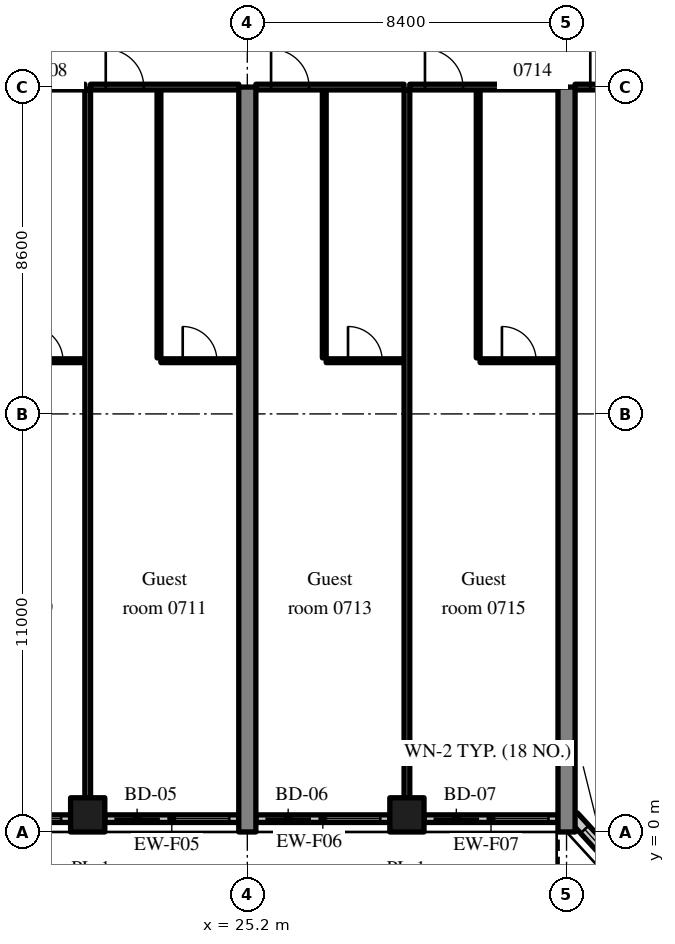
"""IFC4 building model, lengths in metres.
Left out: names, types, materials, properties, quantities, classifications, styles, units other than length and angle.
Written with IfcOpenShell. Run it as: python <this file> out.ifc"""

import sys

from ifc_helpers import new_model, si_unit, direction, frame, frame_2d, origin, origin_2d, place, context, subcontext, project, spatial, rectangle, extrude, source, transform, mapped, element, fill, save


model = new_model("IFC4")
c1 = context("Model", 3, precision=1e-05, world=origin(), true_north=direction((0.0, 1.0)))
c2 = subcontext(c1, "Body", "Model", "MODEL_VIEW")
j1 = project(units=[si_unit("LENGTHUNIT", "METRE"), si_unit("PLANEANGLEUNIT", "RADIAN")], contexts=[c1])
p1 = place(None, origin())
s1 = spatial("IfcSite", under=j1, at=p1, CompositionType="ELEMENT")
p2 = place(p1, origin())
s2 = spatial("IfcBuilding", under=s1, at=p2, CompositionType="ELEMENT")
p3 = place(p2, frame((0.0, 0.0, 35.4)))
s3 = spatial("IfcBuildingStorey", under=s2, at=p3, CompositionType="ELEMENT", Elevation=35.4)
m1 = source(origin(), c2, "Body", "SweptSolid", [
    extrude(rectangle(XDim=19.6, YDim=0.45, at=frame_2d((9.8, 0.0))), origin(), (0.0, 0.0, 1.0), 3.52),
])
for number, where, z_axis, x_axis in (
    (1, (25.2, 0.0, 0.0), (0.0, 0.0, 1.0), (0.0, 1.0, 0.0)),
    (2, (33.6, 0.0, 0.0), (0.0, 0.0, 1.0), (0.0, 1.0, 0.0)),
):
    element("IfcWall", number, at=place(p3, frame(where, z_axis=z_axis, x_axis=x_axis)), inside=s3, PredefinedType="SHEAR", context=c2, shape_type="MappedRepresentation", body=[
        mapped(m1, transform((0.0, 0.0, 0.0), scale=1.0)),
    ])
m2 = source(origin(), c2, "Body", "SweptSolid", [
    extrude(rectangle(XDim=0.9, YDim=0.9, at=origin_2d()), origin(), (0.0, 0.0, 1.0), 3.52),
])
for number, where, z_axis, x_axis in (
    (3, (21.0, 0.45, 0.0), (0.0, 0.0, 1.0), (1.0, 0.0, 0.0)),
    (4, (29.4, 0.45, 0.0), (0.0, 0.0, 1.0), (1.0, 0.0, 0.0)),
):
    element("IfcColumn", number, at=place(p3, frame(where, z_axis=z_axis, x_axis=x_axis)), inside=s3, PredefinedType="COLUMN", context=c2, shape_type="MappedRepresentation", body=[
        mapped(m2, transform((0.0, 0.0, 0.0), scale=1.0)),
    ])
m3 = source(origin(), c2, "Body", "SweptSolid", [
    extrude(rectangle(XDim=3.525, YDim=0.2, at=frame_2d((1.763, 0.0))), origin(), (0.0, 0.0, 1.0), 2.77),
])
p4 = place(p3, frame((17.025, 0.35, 0.0), z_axis=(0.0, 0.0, 1.0), x_axis=(1.0, 0.0, 0.0)))
e5 = element("IfcWall", 5, at=p4, inside=s3, PredefinedType="SOLIDWALL", context=c2, shape_type="MappedRepresentation", body=[
    mapped(m3, transform((0.0, 0.0, 0.0), scale=1.0)),
])
m4 = source(origin(), c2, "Body", "SweptSolid", [
    extrude(rectangle(XDim=1.2, YDim=2.4, at=frame_2d((0.6, 1.2))), frame((0.0, 0.11, 0.0), z_axis=(0.0, -1.0, 0.0), x_axis=(1.0, 0.0, 0.0)), (0.0, 0.0, 1.0), 0.22),
])
p5 = place(p4, frame((0.25, 0.0, 0.0)))
e6 = element("IfcOpeningElement", 6, at=p5, cuts=e5, PredefinedType="OPENING", context=c2, shape_type="MappedRepresentation", body=[
    mapped(m4, transform((0.0, 0.0, 0.0), scale=1.0)),
])
m5 = source(origin(), c2, "Body", "SweptSolid", [
    extrude(rectangle(XDim=1.5, YDim=1.5, at=frame_2d((0.75, 0.75))), frame((0.0, 0.11, 0.0), z_axis=(0.0, -1.0, 0.0), x_axis=(1.0, 0.0, 0.0)), (0.0, 0.0, 1.0), 0.22),
])
p6 = place(p4, frame((1.775, 0.0, 0.9)))
e7 = element("IfcOpeningElement", 7, at=p6, cuts=e5, PredefinedType="OPENING", context=c2, shape_type="MappedRepresentation", body=[
    mapped(m5, transform((0.0, 0.0, 0.0), scale=1.0)),
])
p7 = place(p3, frame((21.45, 0.35, 0.0), z_axis=(0.0, 0.0, 1.0), x_axis=(1.0, 0.0, 0.0)))
e8 = element("IfcWall", 8, at=p7, inside=s3, PredefinedType="SOLIDWALL", context=c2, shape_type="MappedRepresentation", body=[
    mapped(m3, transform((0.0, 0.0, 0.0), scale=1.0)),
])
p8 = place(p7, frame((0.25, 0.0, 0.0)))
e9 = element("IfcOpeningElement", 9, at=p8, cuts=e8, PredefinedType="OPENING", context=c2, shape_type="MappedRepresentation", body=[
    mapped(m4, transform((0.0, 0.0, 0.0), scale=1.0)),
])
p9 = place(p7, frame((1.775, 0.0, 0.9)))
e10 = element("IfcOpeningElement", 10, at=p9, cuts=e8, PredefinedType="OPENING", context=c2, shape_type="MappedRepresentation", body=[
    mapped(m5, transform((0.0, 0.0, 0.0), scale=1.0)),
])
m6 = source(origin(), c2, "Body", "SweptSolid", [
    extrude(rectangle(XDim=3.525, YDim=0.2, at=frame_2d((1.762, 0.0))), origin(), (0.0, 0.0, 1.0), 2.77),
])
p10 = place(p3, frame((25.425, 0.35, 0.0), z_axis=(0.0, 0.0, 1.0), x_axis=(1.0, 0.0, 0.0)))
e11 = element("IfcWall", 11, at=p10, inside=s3, PredefinedType="SOLIDWALL", context=c2, shape_type="MappedRepresentation", body=[
    mapped(m6, transform((0.0, 0.0, 0.0), scale=1.0)),
])
p11 = place(p10, frame((0.25, 0.0, 0.0)))
e12 = element("IfcOpeningElement", 12, at=p11, cuts=e11, PredefinedType="OPENING", context=c2, shape_type="MappedRepresentation", body=[
    mapped(m4, transform((0.0, 0.0, 0.0), scale=1.0)),
])
p12 = place(p10, frame((1.775, 0.0, 0.9)))
e13 = element("IfcOpeningElement", 13, at=p12, cuts=e11, PredefinedType="OPENING", context=c2, shape_type="MappedRepresentation", body=[
    mapped(m5, transform((0.0, 0.0, 0.0), scale=1.0)),
])
p13 = place(p3, frame((29.85, 0.35, 0.0), z_axis=(0.0, 0.0, 1.0), x_axis=(1.0, 0.0, 0.0)))
e14 = element("IfcWall", 14, at=p13, inside=s3, PredefinedType="SOLIDWALL", context=c2, shape_type="MappedRepresentation", body=[
    mapped(m6, transform((0.0, 0.0, 0.0), scale=1.0)),
])
p14 = place(p13, frame((0.25, 0.0, 0.0)))
e15 = element("IfcOpeningElement", 15, at=p14, cuts=e14, PredefinedType="OPENING", context=c2, shape_type="MappedRepresentation", body=[
    mapped(m4, transform((0.0, 0.0, 0.0), scale=1.0)),
])
p15 = place(p13, frame((1.775, 0.0, 0.9)))
e16 = element("IfcOpeningElement", 16, at=p15, cuts=e14, PredefinedType="OPENING", context=c2, shape_type="MappedRepresentation", body=[
    mapped(m5, transform((0.0, 0.0, 0.0), scale=1.0)),
])
m7 = source(origin(), c2, "Body", "SweptSolid", [
    extrude(rectangle(XDim=2.398, YDim=0.3, at=frame_2d((1.199, 0.0))), origin(), (0.0, 0.0, 1.0), 3.52),
])
p16 = place(p3, frame((33.776, 0.4, 0.0), z_axis=(0.0, 0.0, 1.0), x_axis=(0.675374189419, -0.737475222815, 0.0)))
e17 = element("IfcWall", 17, at=p16, inside=s3, PredefinedType="SOLIDWALL", context=c2, shape_type="MappedRepresentation", body=[
    mapped(m7, transform((0.0, 0.0, 0.0), scale=1.0)),
])
m8 = source(origin(), c2, "Body", "SweptSolid", [
    extrude(rectangle(XDim=1.5, YDim=2.0, at=frame_2d((0.75, 1.0))), frame((0.0, 0.16, 0.0), z_axis=(0.0, -1.0, 0.0), x_axis=(1.0, 0.0, 0.0)), (0.0, 0.0, 1.0), 0.32),
])
p17 = place(p16, frame((0.449, 0.0, 0.9)))
e18 = element("IfcOpeningElement", 18, at=p17, cuts=e17, PredefinedType="OPENING", context=c2, shape_type="MappedRepresentation", body=[
    mapped(m8, transform((0.0, 0.0, 0.0), scale=1.0)),
])
m9 = source(origin(), c2, "Body", "SweptSolid", [
    extrude(rectangle(XDim=2.05, YDim=0.1, at=frame_2d((1.025, 0.0))), origin(), (0.0, 0.0, 1.0), 3.52),
])
p18 = place(p3, frame((18.875, 12.4, 0.0), z_axis=(0.0, 0.0, 1.0), x_axis=(1.0, 0.0, 0.0)))
e19 = element("IfcWall", 19, at=p18, inside=s3, PredefinedType="PARTITIONING", context=c2, shape_type="MappedRepresentation", body=[
    mapped(m9, transform((0.0, 0.0, 0.0), scale=1.0)),
])
m10 = source(origin(), c2, "Body", "SweptSolid", [
    extrude(rectangle(XDim=0.9, YDim=2.1, at=frame_2d((0.45, 1.05))), frame((0.0, 0.06, 0.0), z_axis=(0.0, -1.0, 0.0), x_axis=(1.0, 0.0, 0.0)), (0.0, 0.0, 1.0), 0.12),
])
p19 = place(p18, frame((0.575, 0.0, 0.0)))
e20 = element("IfcOpeningElement", 20, at=p19, cuts=e19, PredefinedType="OPENING", context=c2, shape_type="MappedRepresentation", body=[
    mapped(m10, transform((0.0, 0.0, 0.0), scale=1.0)),
])
m11 = source(origin(), c2, "Body", "SweptSolid", [
    extrude(rectangle(XDim=3.9, YDim=0.15, at=frame_2d((1.95, 0.0))), origin(), (0.0, 0.0, 1.0), 2.82),
])
p20 = place(p3, frame((17.025, 19.6, 0.0), z_axis=(0.0, 0.0, 1.0), x_axis=(1.0, 0.0, 0.0)))
e21 = element("IfcWall", 21, at=p20, inside=s3, PredefinedType="PARTITIONING", context=c2, shape_type="MappedRepresentation", body=[
    mapped(m11, transform((0.0, 0.0, 0.0), scale=1.0)),
])
m12 = source(origin(), c2, "Body", "SweptSolid", [
    extrude(rectangle(XDim=1.0, YDim=2.1, at=frame_2d((0.5, 1.05))), frame((0.0, 0.085, 0.0), z_axis=(0.0, -1.0, 0.0), x_axis=(1.0, 0.0, 0.0)), (0.0, 0.0, 1.0), 0.17),
])
p21 = place(p20, frame((0.4, 0.0, 0.0)))
e22 = element("IfcOpeningElement", 22, at=p21, cuts=e21, PredefinedType="OPENING", context=c2, shape_type="MappedRepresentation", body=[
    mapped(m12, transform((0.0, 0.0, 0.0), scale=1.0)),
])
m13 = source(origin(), c2, "Body", "SweptSolid", [
    extrude(rectangle(XDim=7.05, YDim=0.1, at=frame_2d((3.525, 0.0))), origin(), (0.0, 0.0, 1.0), 3.52),
])
p22 = place(p3, frame((22.875, 12.475, 0.0), z_axis=(0.0, 0.0, 1.0), x_axis=(0.0, 1.0, 0.0)))
e23 = element("IfcWall", 23, at=p22, inside=s3, PredefinedType="PARTITIONING", context=c2, shape_type="MappedRepresentation", body=[
    mapped(m13, transform((0.0, 0.0, 0.0), scale=1.0)),
])
p23 = place(p3, frame((22.925, 12.4, 0.0), z_axis=(0.0, 0.0, 1.0), x_axis=(1.0, 0.0, 0.0)))
e24 = element("IfcWall", 24, at=p23, inside=s3, PredefinedType="PARTITIONING", context=c2, shape_type="MappedRepresentation", body=[
    mapped(m9, transform((0.0, 0.0, 0.0), scale=1.0)),
])
p24 = place(p23, frame((0.575, 0.0, 0.0)))
e25 = element("IfcOpeningElement", 25, at=p24, cuts=e24, PredefinedType="OPENING", context=c2, shape_type="MappedRepresentation", body=[
    mapped(m10, transform((0.0, 0.0, 0.0), scale=1.0)),
])
p25 = place(p3, frame((21.075, 19.6, 0.0), z_axis=(0.0, 0.0, 1.0), x_axis=(1.0, 0.0, 0.0)))
e26 = element("IfcWall", 26, at=p25, inside=s3, PredefinedType="PARTITIONING", context=c2, shape_type="MappedRepresentation", body=[
    mapped(m11, transform((0.0, 0.0, 0.0), scale=1.0)),
])
p26 = place(p25, frame((0.4, 0.0, 0.0)))
e27 = element("IfcOpeningElement", 27, at=p26, cuts=e26, PredefinedType="OPENING", context=c2, shape_type="MappedRepresentation", body=[
    mapped(m12, transform((0.0, 0.0, 0.0), scale=1.0)),
])
m14 = source(origin(), c2, "Body", "SweptSolid", [
    extrude(rectangle(XDim=18.625, YDim=0.15, at=frame_2d((9.312, 0.0))), origin(), (0.0, 0.0, 1.0), 3.52),
])
p27 = place(p3, frame((21.0, 0.9, 0.0), z_axis=(0.0, 0.0, 1.0), x_axis=(0.0, 1.0, 0.0)))
e28 = element("IfcWall", 28, at=p27, inside=s3, PredefinedType="PARTITIONING", context=c2, shape_type="MappedRepresentation", body=[
    mapped(m14, transform((0.0, 0.0, 0.0), scale=1.0)),
])
p28 = place(p3, frame((27.225, 12.475, 0.0), z_axis=(0.0, 0.0, 1.0), x_axis=(0.0, 1.0, 0.0)))
e29 = element("IfcWall", 29, at=p28, inside=s3, PredefinedType="PARTITIONING", context=c2, shape_type="MappedRepresentation", body=[
    mapped(m13, transform((0.0, 0.0, 0.0), scale=1.0)),
])
p29 = place(p3, frame((27.275, 12.4, 0.0), z_axis=(0.0, 0.0, 1.0), x_axis=(1.0, 0.0, 0.0)))
e30 = element("IfcWall", 30, at=p29, inside=s3, PredefinedType="PARTITIONING", context=c2, shape_type="MappedRepresentation", body=[
    mapped(m9, transform((0.0, 0.0, 0.0), scale=1.0)),
])
p30 = place(p29, frame((0.575, 0.0, 0.0)))
e31 = element("IfcOpeningElement", 31, at=p30, cuts=e30, PredefinedType="OPENING", context=c2, shape_type="MappedRepresentation", body=[
    mapped(m10, transform((0.0, 0.0, 0.0), scale=1.0)),
])
m15 = source(origin(), c2, "Body", "SweptSolid", [
    extrude(rectangle(XDim=3.9, YDim=0.15, at=frame_2d((1.95, 0.0))), origin(), (0.0, 0.0, 1.0), 2.82),
])
p31 = place(p3, frame((25.425, 19.6, 0.0), z_axis=(0.0, 0.0, 1.0), x_axis=(1.0, 0.0, 0.0)))
e32 = element("IfcWall", 32, at=p31, inside=s3, PredefinedType="PARTITIONING", context=c2, shape_type="MappedRepresentation", body=[
    mapped(m15, transform((0.0, 0.0, 0.0), scale=1.0)),
])
p32 = place(p31, frame((0.4, 0.0, 0.0)))
e33 = element("IfcOpeningElement", 33, at=p32, cuts=e32, PredefinedType="OPENING", context=c2, shape_type="MappedRepresentation", body=[
    mapped(m12, transform((0.0, 0.0, 0.0), scale=1.0)),
])
p33 = place(p3, frame((31.275, 12.475, 0.0), z_axis=(0.0, 0.0, 1.0), x_axis=(0.0, 1.0, 0.0)))
e34 = element("IfcWall", 34, at=p33, inside=s3, PredefinedType="PARTITIONING", context=c2, shape_type="MappedRepresentation", body=[
    mapped(m13, transform((0.0, 0.0, 0.0), scale=1.0)),
])
p34 = place(p3, frame((31.325, 12.4, 0.0), z_axis=(0.0, 0.0, 1.0), x_axis=(1.0, 0.0, 0.0)))
e35 = element("IfcWall", 35, at=p34, inside=s3, PredefinedType="PARTITIONING", context=c2, shape_type="MappedRepresentation", body=[
    mapped(m9, transform((0.0, 0.0, 0.0), scale=1.0)),
])
p35 = place(p34, frame((0.575, 0.0, 0.0)))
e36 = element("IfcOpeningElement", 36, at=p35, cuts=e35, PredefinedType="OPENING", context=c2, shape_type="MappedRepresentation", body=[
    mapped(m10, transform((0.0, 0.0, 0.0), scale=1.0)),
])
p36 = place(p3, frame((29.475, 19.6, 0.0), z_axis=(0.0, 0.0, 1.0), x_axis=(1.0, 0.0, 0.0)))
e37 = element("IfcWall", 37, at=p36, inside=s3, PredefinedType="PARTITIONING", context=c2, shape_type="MappedRepresentation", body=[
    mapped(m15, transform((0.0, 0.0, 0.0), scale=1.0)),
])
p37 = place(p36, frame((0.4, 0.0, 0.0)))
e38 = element("IfcOpeningElement", 38, at=p37, cuts=e37, PredefinedType="OPENING", context=c2, shape_type="MappedRepresentation", body=[
    mapped(m12, transform((0.0, 0.0, 0.0), scale=1.0)),
])
p38 = place(p3, frame((29.4, 0.9, 0.0), z_axis=(0.0, 0.0, 1.0), x_axis=(0.0, 1.0, 0.0)))
e39 = element("IfcWall", 39, at=p38, inside=s3, PredefinedType="PARTITIONING", context=c2, shape_type="MappedRepresentation", body=[
    mapped(m14, transform((0.0, 0.0, 0.0), scale=1.0)),
])
p39 = place(p3, frame((33.825, 19.6, 0.0), z_axis=(0.0, 0.0, 1.0), x_axis=(1.0, 0.0, 0.0)))
e40 = element("IfcWall", 40, at=p39, inside=s3, PredefinedType="PARTITIONING", context=c2, shape_type="MappedRepresentation", body=[
    mapped(m11, transform((0.0, 0.0, 0.0), scale=1.0)),
])
p40 = place(p39, frame((0.4, 0.0, 0.0)))
e41 = element("IfcOpeningElement", 41, at=p40, cuts=e40, PredefinedType="OPENING", context=c2, shape_type="MappedRepresentation", body=[
    mapped(m12, transform((0.0, 0.0, 0.0), scale=1.0)),
])
m16 = source(origin(), c2, "Body", "SweptSolid", [
    extrude(rectangle(XDim=1.5, YDim=1.5, at=frame_2d((0.75, 0.75))), frame((0.0, 0.03, 0.0), z_axis=(0.0, -1.0, 0.0), x_axis=(1.0, 0.0, 0.0)), (0.0, 0.0, 1.0), 0.06),
])
p41 = place(p6, origin())
e42 = element("IfcWindow", 42, at=p41, inside=s3, PartitioningType="SINGLE_PANEL", PredefinedType="WINDOW", context=c2, shape_type="MappedRepresentation", body=[
    mapped(m16, transform((0.0, 0.0, 0.0), scale=1.0)),
])
fill(e7, e42)
m17 = source(origin(), c2, "Body", "SweptSolid", [
    extrude(rectangle(XDim=1.2, YDim=2.4, at=frame_2d((0.6, 1.2))), frame((0.0, 0.025, 0.0), z_axis=(0.0, -1.0, 0.0), x_axis=(1.0, 0.0, 0.0)), (0.0, 0.0, 1.0), 0.05),
])
p42 = place(p8, origin())
e43 = element("IfcDoor", 43, at=p42, inside=s3, OperationType="SLIDING_TO_LEFT", PredefinedType="DOOR", context=c2, shape_type="MappedRepresentation", body=[
    mapped(m17, transform((0.0, 0.0, 0.0), scale=1.0)),
])
fill(e9, e43)
p43 = place(p9, origin())
e44 = element("IfcWindow", 44, at=p43, inside=s3, PartitioningType="SINGLE_PANEL", PredefinedType="WINDOW", context=c2, shape_type="MappedRepresentation", body=[
    mapped(m16, transform((0.0, 0.0, 0.0), scale=1.0)),
])
fill(e10, e44)
p44 = place(p11, origin())
e45 = element("IfcDoor", 45, at=p44, inside=s3, OperationType="SLIDING_TO_RIGHT", PredefinedType="DOOR", context=c2, shape_type="MappedRepresentation", body=[
    mapped(m17, transform((0.0, 0.0, 0.0), scale=1.0)),
])
fill(e12, e45)
p45 = place(p12, origin())
e46 = element("IfcWindow", 46, at=p45, inside=s3, PartitioningType="SINGLE_PANEL", PredefinedType="WINDOW", context=c2, shape_type="MappedRepresentation", body=[
    mapped(m16, transform((0.0, 0.0, 0.0), scale=1.0)),
])
fill(e13, e46)
p46 = place(p14, origin())
e47 = element("IfcDoor", 47, at=p46, inside=s3, OperationType="SLIDING_TO_LEFT", PredefinedType="DOOR", context=c2, shape_type="MappedRepresentation", body=[
    mapped(m17, transform((0.0, 0.0, 0.0), scale=1.0)),
])
fill(e15, e47)
p47 = place(p15, origin())
e48 = element("IfcWindow", 48, at=p47, inside=s3, PartitioningType="SINGLE_PANEL", PredefinedType="WINDOW", context=c2, shape_type="MappedRepresentation", body=[
    mapped(m16, transform((0.0, 0.0, 0.0), scale=1.0)),
])
fill(e16, e48)
m18 = source(origin(), c2, "Body", "SweptSolid", [
    extrude(rectangle(XDim=1.5, YDim=2.0, at=frame_2d((0.75, 1.0))), frame((0.0, 0.03, 0.0), z_axis=(0.0, -1.0, 0.0), x_axis=(1.0, 0.0, 0.0)), (0.0, 0.0, 1.0), 0.06),
])
p48 = place(p17, origin())
e49 = element("IfcWindow", 49, at=p48, inside=s3, PartitioningType="SINGLE_PANEL", PredefinedType="WINDOW", context=c2, shape_type="MappedRepresentation", body=[
    mapped(m18, transform((0.0, 0.0, 0.0), scale=1.0)),
])
fill(e18, e49)
m19 = source(origin(), c2, "Body", "SweptSolid", [
    extrude(rectangle(XDim=0.9, YDim=2.1, at=frame_2d((0.45, 1.05))), frame((0.0, 0.025, 0.0), z_axis=(0.0, -1.0, 0.0), x_axis=(1.0, 0.0, 0.0)), (0.0, 0.0, 1.0), 0.05),
])
p49 = place(p19, origin())
e50 = element("IfcDoor", 50, at=p49, inside=s3, OperationType="SINGLE_SWING_LEFT", PredefinedType="DOOR", context=c2, shape_type="MappedRepresentation", body=[
    mapped(m19, transform((0.0, 0.0, 0.0), scale=1.0)),
])
fill(e20, e50)
p50 = place(p24, origin())
e51 = element("IfcDoor", 51, at=p50, inside=s3, OperationType="SINGLE_SWING_LEFT", PredefinedType="DOOR", context=c2, shape_type="MappedRepresentation", body=[
    mapped(m19, transform((0.0, 0.0, 0.0), scale=1.0)),
])
fill(e25, e51)
m20 = source(origin(), c2, "Body", "SweptSolid", [
    extrude(rectangle(XDim=1.0, YDim=2.1, at=frame_2d((0.5, 1.05))), frame((0.0, 0.025, 0.0), z_axis=(0.0, -1.0, 0.0), x_axis=(1.0, 0.0, 0.0)), (0.0, 0.0, 1.0), 0.05),
])
p51 = place(p26, origin())
e52 = element("IfcDoor", 52, at=p51, inside=s3, OperationType="SINGLE_SWING_LEFT", PredefinedType="DOOR", context=c2, shape_type="MappedRepresentation", body=[
    mapped(m20, transform((0.0, 0.0, 0.0), scale=1.0)),
])
fill(e27, e52)
p52 = place(p30, origin())
e53 = element("IfcDoor", 53, at=p52, inside=s3, OperationType="SINGLE_SWING_LEFT", PredefinedType="DOOR", context=c2, shape_type="MappedRepresentation", body=[
    mapped(m19, transform((0.0, 0.0, 0.0), scale=1.0)),
])
fill(e31, e53)
p53 = place(p32, origin())
e54 = element("IfcDoor", 54, at=p53, inside=s3, OperationType="SINGLE_SWING_LEFT", PredefinedType="DOOR", context=c2, shape_type="MappedRepresentation", body=[
    mapped(m20, transform((0.0, 0.0, 0.0), scale=1.0)),
])
fill(e33, e54)
p54 = place(p35, origin())
e55 = element("IfcDoor", 55, at=p54, inside=s3, OperationType="SINGLE_SWING_LEFT", PredefinedType="DOOR", context=c2, shape_type="MappedRepresentation", body=[
    mapped(m19, transform((0.0, 0.0, 0.0), scale=1.0)),
])
fill(e36, e55)
p55 = place(p37, origin())
e56 = element("IfcDoor", 56, at=p55, inside=s3, OperationType="SINGLE_SWING_LEFT", PredefinedType="DOOR", context=c2, shape_type="MappedRepresentation", body=[
    mapped(m20, transform((0.0, 0.0, 0.0), scale=1.0)),
])
fill(e38, e56)
p56 = place(p40, origin())
e57 = element("IfcDoor", 57, at=p56, inside=s3, OperationType="SINGLE_SWING_LEFT", PredefinedType="DOOR", context=c2, shape_type="MappedRepresentation", body=[
    mapped(m20, transform((0.0, 0.0, 0.0), scale=1.0)),
])
fill(e41, e57)
save(model, sys.argv[1])
